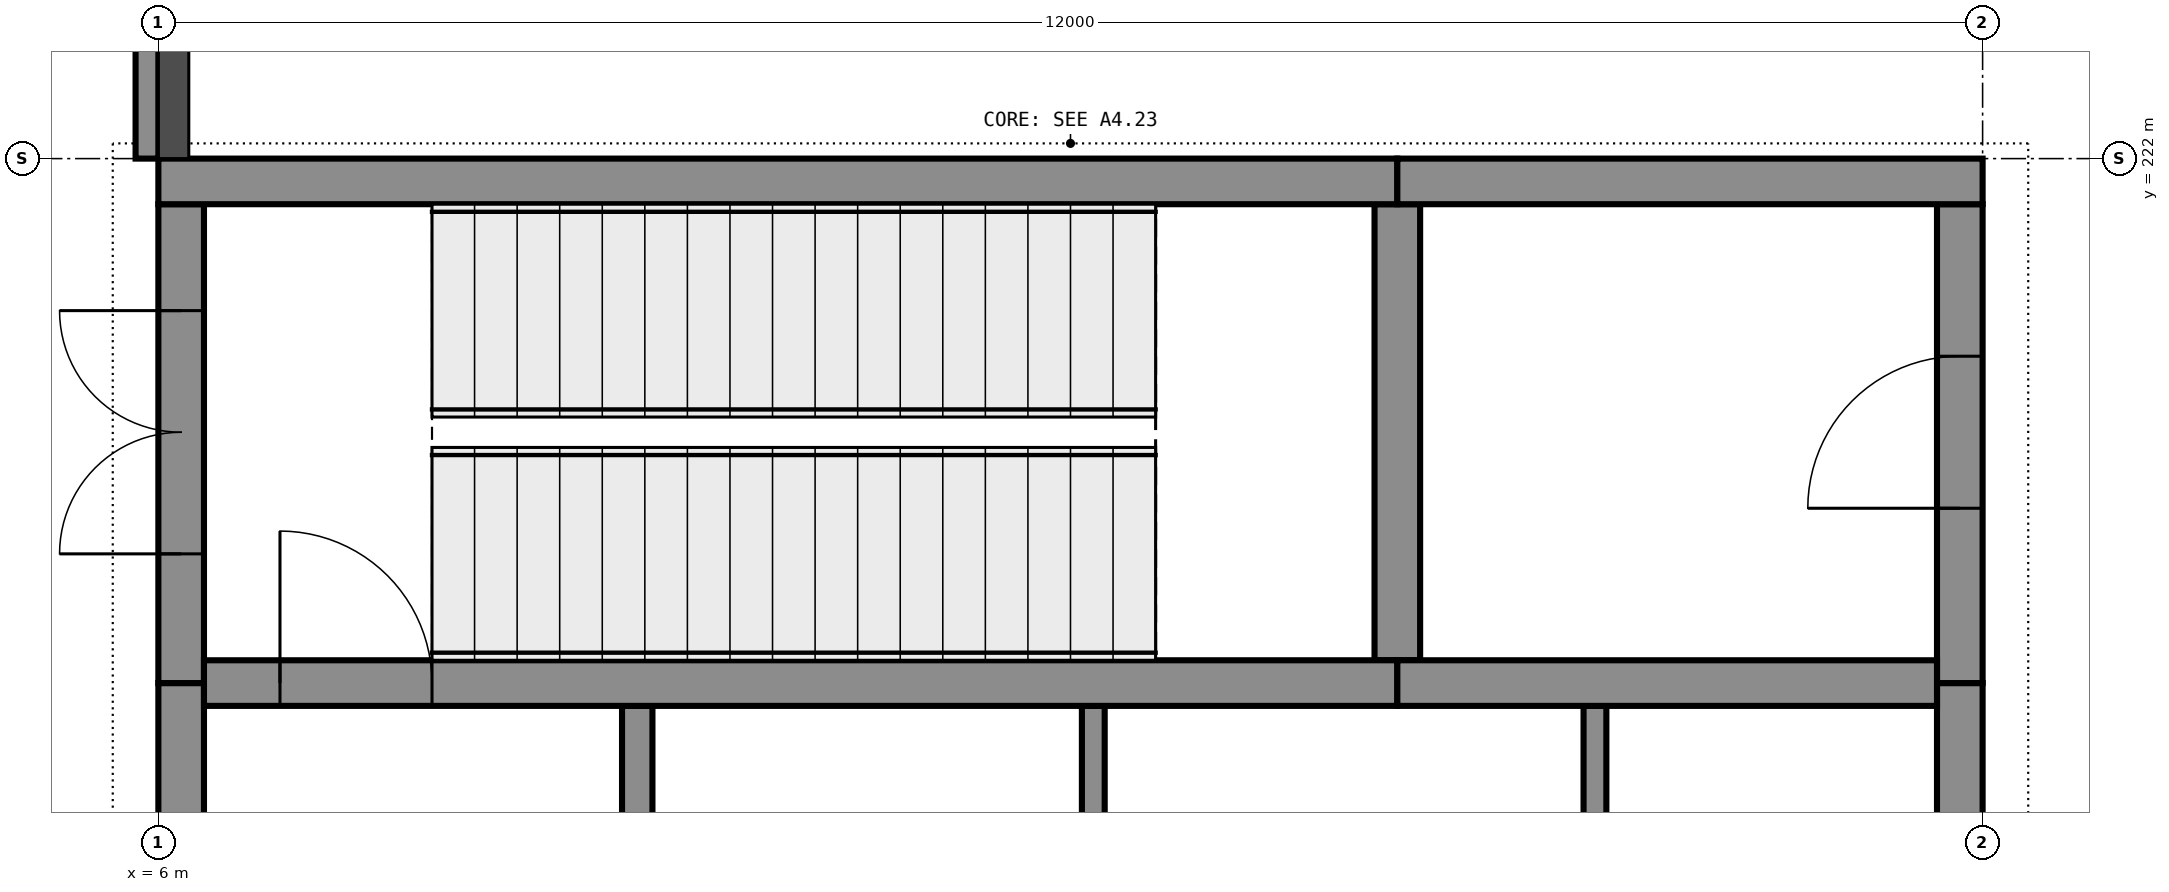
"""IFC4 building model, lengths in metres.
Left out: names, types, materials, properties, quantities, classifications, styles, units other than length and angle.
Written with IfcOpenShell. Run it as: python <this file> out.ifc"""

import sys

from ifc_helpers import new_model, si_unit, direction, frame, frame_2d, origin, place, context, subcontext, project, spatial, rectangle, extrude, element, fill, save


model = new_model("IFC4")
c1 = context("Model", 3, precision=1e-05, world=origin(), true_north=direction((0.0, 1.0)))
c2 = subcontext(c1, "Body", "Model", "MODEL_VIEW")
j1 = project(units=[si_unit("LENGTHUNIT", "METRE"), si_unit("PLANEANGLEUNIT", "RADIAN")], contexts=[c1])
p1 = place(None, origin())
s1 = spatial("IfcSite", under=j1, at=p1, CompositionType="ELEMENT")
p2 = place(p1, origin())
s2 = spatial("IfcBuilding", under=s1, at=p2, CompositionType="ELEMENT")
p3 = place(p2, origin())
s3 = spatial("IfcBuildingStorey", under=s2, at=p3, CompositionType="ELEMENT", Elevation=0.0)
p4 = place(p3, frame((6.0, 221.85, 0.0), z_axis=(0.0, 0.0, 1.0), x_axis=(1.0, 0.0, 0.0)))
e1 = element("IfcWall", 1, at=p4, inside=s3, PredefinedType="SHEAR", context=c2, shape_type="SweptSolid", body=[
    extrude(rectangle(XDim=8.15, YDim=0.3, at=frame_2d((4.075, 0.0))), origin(), (0.0, 0.0, 1.0), 5.75),
])
p5 = place(p3, frame((14.15, 221.85, 0.0), z_axis=(0.0, 0.0, 1.0), x_axis=(1.0, 0.0, 0.0)))
e2 = element("IfcWall", 2, at=p5, inside=s3, PredefinedType="SHEAR", context=c2, shape_type="SweptSolid", body=[
    extrude(rectangle(XDim=3.85, YDim=0.3, at=frame_2d((1.925, 0.0))), origin(), (0.0, 0.0, 1.0), 5.75),
])
p6 = place(p3, frame((6.3, 218.55, 0.0), z_axis=(0.0, 0.0, 1.0), x_axis=(1.0, 0.0, 0.0)))
e3 = element("IfcWall", 3, at=p6, inside=s3, PredefinedType="SHEAR", context=c2, shape_type="SweptSolid", body=[
    extrude(rectangle(XDim=7.85, YDim=0.3, at=frame_2d((3.925, 0.0))), origin(), (0.0, 0.0, 1.0), 5.75),
])
p7 = place(p6, frame((0.5, 0.0, 0.0)))
e4 = element("IfcOpeningElement", 4, at=p7, cuts=e3, PredefinedType="OPENING", context=c2, shape_type="SweptSolid", body=[
    extrude(rectangle(XDim=1.0, YDim=2.1, at=frame_2d((0.5, 1.05))), frame((0.0, 0.16, 0.0), z_axis=(0.0, -1.0, 0.0), x_axis=(1.0, 0.0, 0.0)), (0.0, 0.0, 1.0), 0.32),
])
p8 = place(p3, frame((14.15, 218.55, 0.0), z_axis=(0.0, 0.0, 1.0), x_axis=(1.0, 0.0, 0.0)))
e5 = element("IfcWall", 5, at=p8, inside=s3, PredefinedType="SHEAR", context=c2, shape_type="SweptSolid", body=[
    extrude(rectangle(XDim=3.55, YDim=0.3, at=frame_2d((1.775, 0.0))), origin(), (0.0, 0.0, 1.0), 5.75),
])
p9 = place(p3, frame((6.15, 213.45, 0.0), z_axis=(0.0, 0.0, 1.0), x_axis=(0.0, 1.0, 0.0)))
e6 = element("IfcWall", 6, at=p9, inside=s3, PredefinedType="SHEAR", context=c2, shape_type="SweptSolid", body=[
    extrude(rectangle(XDim=5.1, YDim=0.3, at=frame_2d((2.55, 0.0))), origin(), (0.0, 0.0, 1.0), 5.75),
])
p10 = place(p3, frame((6.15, 218.55, 0.0), z_axis=(0.0, 0.0, 1.0), x_axis=(0.0, 1.0, 0.0)))
e7 = element("IfcWall", 7, at=p10, inside=s3, PredefinedType="SHEAR", context=c2, shape_type="SweptSolid", body=[
    extrude(rectangle(XDim=3.15, YDim=0.3, at=frame_2d((1.575, 0.0))), origin(), (0.0, 0.0, 1.0), 5.75),
])
p11 = place(p10, frame((0.85, 0.0, 0.0)))
e8 = element("IfcOpeningElement", 8, at=p11, cuts=e7, PredefinedType="OPENING", context=c2, shape_type="SweptSolid", body=[
    extrude(rectangle(XDim=1.6, YDim=2.1, at=frame_2d((0.8, 1.05))), frame((0.0, 0.16, 0.0), z_axis=(0.0, -1.0, 0.0), x_axis=(1.0, 0.0, 0.0)), (0.0, 0.0, 1.0), 0.32),
])
p12 = place(p3, frame((17.85, 213.45, 0.0), z_axis=(0.0, 0.0, 1.0), x_axis=(0.0, 1.0, 0.0)))
e9 = element("IfcWall", 9, at=p12, inside=s3, PredefinedType="SHEAR", context=c2, shape_type="SweptSolid", body=[
    extrude(rectangle(XDim=5.1, YDim=0.3, at=frame_2d((2.55, 0.0))), origin(), (0.0, 0.0, 1.0), 5.75),
])
p13 = place(p12, frame((0.3, 0.0, 0.0)))
e10 = element("IfcOpeningElement", 10, at=p13, cuts=e9, PredefinedType="OPENING", context=c2, shape_type="SweptSolid", body=[
    extrude(rectangle(XDim=1.5, YDim=2.1, at=frame_2d((0.75, 1.05))), frame((0.0, 0.16, 0.0), z_axis=(0.0, -1.0, 0.0), x_axis=(1.0, 0.0, 0.0)), (0.0, 0.0, 1.0), 0.32),
])
p14 = place(p3, frame((17.85, 218.55, 0.0), z_axis=(0.0, 0.0, 1.0), x_axis=(0.0, 1.0, 0.0)))
e11 = element("IfcWall", 11, at=p14, inside=s3, PredefinedType="SHEAR", context=c2, shape_type="SweptSolid", body=[
    extrude(rectangle(XDim=3.15, YDim=0.3, at=frame_2d((1.575, 0.0))), origin(), (0.0, 0.0, 1.0), 5.75),
])
p15 = place(p14, frame((1.15, 0.0, 0.0)))
e12 = element("IfcOpeningElement", 12, at=p15, cuts=e11, PredefinedType="OPENING", context=c2, shape_type="SweptSolid", body=[
    extrude(rectangle(XDim=1.0, YDim=2.1, at=frame_2d((0.5, 1.05))), frame((0.0, 0.16, 0.0), z_axis=(0.0, -1.0, 0.0), x_axis=(1.0, 0.0, 0.0)), (0.0, 0.0, 1.0), 0.32),
])
p16 = place(p3, frame((14.15, 218.7, 0.0), z_axis=(0.0, 0.0, 1.0), x_axis=(0.0, 1.0, 0.0)))
e13 = element("IfcWall", 13, at=p16, inside=s3, PredefinedType="SHEAR", context=c2, shape_type="SweptSolid", body=[
    extrude(rectangle(XDim=3.0, YDim=0.3, at=frame_2d((1.5, 0.0))), origin(), (0.0, 0.0, 1.0), 5.75),
])
p17 = place(p3, frame((5.925, 233.5, 5.75), z_axis=(0.0, 0.0, 1.0), x_axis=(0.0, -1.0, 0.0)))
e14 = element("IfcWall", 14, at=p17, inside=s3, PredefinedType="STANDARD", context=c2, shape_type="SweptSolid", body=[
    extrude(rectangle(XDim=11.5, YDim=0.15, at=frame_2d((5.75, 0.0))), origin(), (0.0, 0.0, 1.0), 0.25),
])
p18 = place(p3, frame((9.15, 215.65, 0.0), z_axis=(0.0, 0.0, 1.0), x_axis=(0.0, 1.0, 0.0)))
e15 = element("IfcWall", 15, at=p18, inside=s3, PredefinedType="PARTITIONING", context=c2, shape_type="SweptSolid", body=[
    extrude(rectangle(XDim=2.75, YDim=0.2, at=frame_2d((1.375, 0.0))), origin(), (0.0, 0.0, 1.0), 5.75),
])
for number, where, z_axis, x_axis in (
    (16, (12.15, 215.65, 0.0), (0.0, 0.0, 1.0), (0.0, 1.0, 0.0)),
    (17, (15.45, 215.65, 0.0), (0.0, 0.0, 1.0), (0.0, 1.0, 0.0)),
):
    element("IfcWall", number, at=place(p3, frame(where, z_axis=z_axis, x_axis=x_axis)), inside=s3, PredefinedType="PARTITIONING", context=c2, shape_type="SweptSolid", body=[
        extrude(rectangle(XDim=2.75, YDim=0.15, at=frame_2d((1.375, 0.0))), origin(), (0.0, 0.0, 1.0), 5.75),
    ])
p19 = place(p7, origin())
e18 = element("IfcDoor", 18, at=p19, inside=s3, OperationType="SINGLE_SWING_RIGHT", PredefinedType="DOOR", context=c2, shape_type="SweptSolid", body=[
    extrude(rectangle(XDim=1.0, YDim=2.1, at=frame_2d((0.5, 1.05))), frame((0.0, 0.025, 0.0), z_axis=(0.0, -1.0, 0.0), x_axis=(1.0, 0.0, 0.0)), (0.0, 0.0, 1.0), 0.05),
])
fill(e4, e18)
p20 = place(p11, origin())
e19 = element("IfcDoor", 19, at=p20, inside=s3, OperationType="DOUBLE_DOOR_SINGLE_SWING", PredefinedType="DOOR", context=c2, shape_type="SweptSolid", body=[
    extrude(rectangle(XDim=1.6, YDim=2.1, at=frame_2d((0.8, 1.05))), frame((0.0, 0.025, 0.0), z_axis=(0.0, -1.0, 0.0), x_axis=(1.0, 0.0, 0.0)), (0.0, 0.0, 1.0), 0.05),
])
fill(e8, e19)
p21 = place(p15, origin())
e20 = element("IfcDoor", 20, at=p21, inside=s3, OperationType="SINGLE_SWING_RIGHT", PredefinedType="DOOR", context=c2, shape_type="SweptSolid", body=[
    extrude(rectangle(XDim=1.0, YDim=2.1, at=frame_2d((0.5, 1.05))), frame((0.0, 0.025, 0.0), z_axis=(0.0, -1.0, 0.0), x_axis=(1.0, 0.0, 0.0)), (0.0, 0.0, 1.0), 0.05),
])
fill(e12, e20)
save(model, sys.argv[1])
